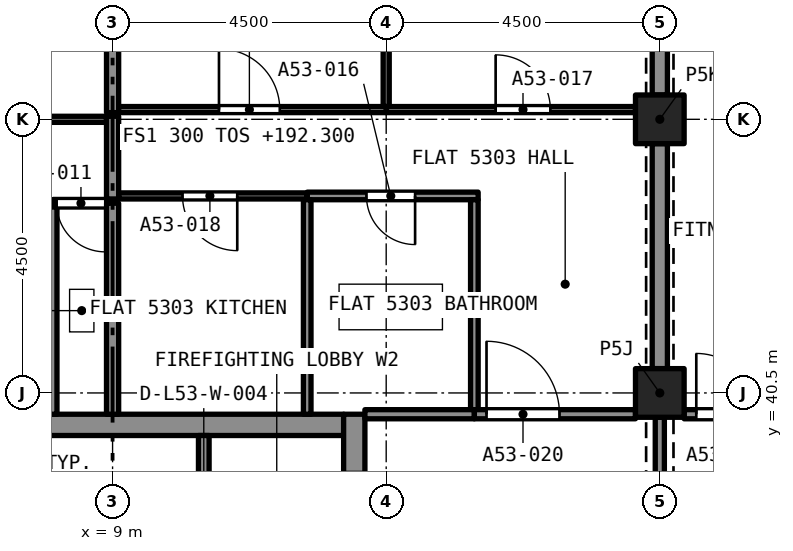
"""IFC4 building model, lengths in metres.
Left out: names, types, materials, properties, quantities, classifications, styles, units other than length and angle.
Written with IfcOpenShell. Run it as: python <this file> out.ifc"""

import sys

from ifc_helpers import new_model, si_unit, direction, frame, frame_2d, origin, origin_2d, place, context, subcontext, project, spatial, rectangle, extrude, element, fill, save


model = new_model("IFC4")
c1 = context("Model", 3, precision=1e-05, world=origin(), true_north=direction((0.0, 1.0)))
c2 = subcontext(c1, "Body", "Model", "MODEL_VIEW")
j1 = project(units=[si_unit("LENGTHUNIT", "METRE"), si_unit("PLANEANGLEUNIT", "RADIAN")], contexts=[c1])
p1 = place(None, origin())
s1 = spatial("IfcSite", under=j1, at=p1, CompositionType="ELEMENT")
p2 = place(p1, origin())
s2 = spatial("IfcBuilding", under=s1, at=p2, CompositionType="ELEMENT")
p3 = place(p2, frame((0.0, 0.0, 192.3)))
s3 = spatial("IfcBuildingStorey", under=s2, at=p3, CompositionType="ELEMENT", Elevation=192.3)
for number, where, z_axis, x_axis in (
    (1, (18.0, 40.5, 0.0), (0.0, 0.0, 1.0), (1.0, 0.0, 0.0)),
    (2, (18.0, 45.0, 0.0), (0.0, 0.0, 1.0), (1.0, 0.0, 0.0)),
):
    element("IfcColumn", number, at=place(p3, frame(where, z_axis=z_axis, x_axis=x_axis)), inside=s3, PredefinedType="COLUMN", context=c2, shape_type="SweptSolid", body=[
        extrude(rectangle(XDim=0.8, YDim=0.8, at=origin_2d()), origin(), (0.0, 0.0, 1.0), 3.2),
    ])
p4 = place(p3, frame((5.2, 39.975, 0.0), z_axis=(0.0, 0.0, 1.0), x_axis=(1.0, 0.0, 0.0)))
e3 = element("IfcWall", 3, at=p4, inside=s3, PredefinedType="SOLIDWALL", context=c2, shape_type="SweptSolid", body=[
    extrude(rectangle(XDim=7.6, YDim=0.35, at=frame_2d((3.8, 0.0))), origin(), (0.0, 0.0, 1.0), 3.2),
])
p5 = place(p3, frame((12.975, 27.35, 0.0), z_axis=(0.0, 0.0, 1.0), x_axis=(0.0, 1.0, 0.0)))
e4 = element("IfcWall", 4, at=p5, inside=s3, PredefinedType="SOLIDWALL", context=c2, shape_type="SweptSolid", body=[
    extrude(rectangle(XDim=12.8, YDim=0.35, at=frame_2d((6.4, 0.0))), origin(), (0.0, 0.0, 1.0), 3.2),
])
p6 = place(p5, frame((10.75, 0.0, 0.0)))
e5 = element("IfcOpeningElement", 5, at=p6, cuts=e4, PredefinedType="OPENING", context=c2, shape_type="SweptSolid", body=[
    extrude(rectangle(XDim=1.1, YDim=2.1, at=frame_2d((0.55, 1.05))), frame((0.0, 0.185, 0.0), z_axis=(0.0, -1.0, 0.0), x_axis=(1.0, 0.0, 0.0)), (0.0, 0.0, 1.0), 0.37),
])
p7 = place(p5, frame((8.6, 0.0, 0.0)))
e6 = element("IfcOpeningElement", 6, at=p7, cuts=e4, PredefinedType="OPENING", context=c2, shape_type="SweptSolid", body=[
    extrude(rectangle(XDim=1.2, YDim=2.1, at=frame_2d((0.6, 1.05))), frame((0.0, 0.185, 0.0), z_axis=(0.0, -1.0, 0.0), x_axis=(1.0, 0.0, 0.0)), (0.0, 0.0, 1.0), 0.37),
])
p8 = place(p3, frame((9.0, 43.62, 0.0), z_axis=(0.0, 0.0, 1.0), x_axis=(-1.0, 0.0, 0.0)))
e7 = element("IfcWall", 7, at=p8, inside=s3, PredefinedType="PARTITIONING", context=c2, shape_type="SweptSolid", body=[
    extrude(rectangle(XDim=0.977, YDim=0.125, at=frame_2d((0.489, 0.0))), origin(), (0.0, 0.0, 1.0), 2.9),
])
p9 = place(p8, frame((0.12, 0.0, 0.0)))
e8 = element("IfcOpeningElement", 8, at=p9, cuts=e7, PredefinedType="OPENING", context=c2, shape_type="SweptSolid", body=[
    extrude(rectangle(XDim=0.8, YDim=2.1, at=frame_2d((0.4, 1.05))), frame((0.0, 0.073, 0.0), z_axis=(0.0, -1.0, 0.0), x_axis=(1.0, 0.0, 0.0)), (0.0, 0.0, 1.0), 0.145),
])
p10 = place(p3, frame((8.023, 40.15, 0.0), z_axis=(0.0, 0.0, 1.0), x_axis=(0.0, 1.0, 0.0)))
e9 = element("IfcWall", 9, at=p10, inside=s3, PredefinedType="PARTITIONING", context=c2, shape_type="SweptSolid", body=[
    extrude(rectangle(XDim=3.408, YDim=0.125, at=frame_2d((1.704, 0.0))), origin(), (0.0, 0.0, 1.0), 2.9),
])
p11 = place(p3, frame((9.0, 40.15, 0.0), z_axis=(0.0, 0.0, 1.0), x_axis=(0.0, 1.0, 0.0)))
e10 = element("IfcWall", 10, at=p11, inside=s3, PredefinedType="PARTITIONING", context=c2, shape_type="SweptSolid", body=[
    extrude(rectangle(XDim=3.47, YDim=0.2, at=frame_2d((1.735, 0.0))), origin(), (0.0, 0.0, 1.0), 2.9),
])
p12 = place(p3, frame((4.5, 45.0, 0.0), z_axis=(0.0, 0.0, 1.0), x_axis=(1.0, 0.0, 0.0)))
e11 = element("IfcWall", 11, at=p12, inside=s3, PredefinedType="PARTITIONING", context=c2, shape_type="SweptSolid", body=[
    extrude(rectangle(XDim=4.4, YDim=0.1, at=frame_2d((2.2, 0.0))), origin(), (0.0, 0.0, 1.0), 2.9),
])
p13 = place(p12, frame((1.8, 0.0, 0.0)))
e12 = element("IfcOpeningElement", 12, at=p13, cuts=e11, PredefinedType="OPENING", context=c2, shape_type="SweptSolid", body=[
    extrude(rectangle(XDim=0.9, YDim=2.1, at=frame_2d((0.45, 1.05))), frame((0.0, 0.06, 0.0), z_axis=(0.0, -1.0, 0.0), x_axis=(1.0, 0.0, 0.0)), (0.0, 0.0, 1.0), 0.12),
])
p14 = place(p3, frame((9.0, 45.11, 0.0), z_axis=(0.0, 0.0, 1.0), x_axis=(0.0, 1.0, 0.0)))
e13 = element("IfcWall", 13, at=p14, inside=s3, PredefinedType="PARTITIONING", context=c2, shape_type="SweptSolid", body=[
    extrude(rectangle(XDim=3.99, YDim=0.2, at=frame_2d((1.995, 0.0))), origin(), (0.0, 0.0, 1.0), 2.9),
])
p15 = place(p3, frame((8.023, 43.62, 0.0), z_axis=(0.0, 0.0, 1.0), x_axis=(-1.0, 0.0, 0.0)))
e14 = element("IfcWall", 14, at=p15, inside=s3, PredefinedType="PARTITIONING", context=c2, shape_type="SweptSolid", body=[
    extrude(rectangle(XDim=1.223, YDim=0.1, at=frame_2d((0.611, 0.0))), origin(), (0.0, 0.0, 1.0), 2.9),
])
p16 = place(p15, frame((0.136, 0.0, 0.0)))
e15 = element("IfcOpeningElement", 15, at=p16, cuts=e14, PredefinedType="OPENING", context=c2, shape_type="SweptSolid", body=[
    extrude(rectangle(XDim=0.9, YDim=2.1, at=frame_2d((0.45, 1.05))), frame((0.0, 0.06, 0.0), z_axis=(0.0, -1.0, 0.0), x_axis=(1.0, 0.0, 0.0)), (0.0, 0.0, 1.0), 0.12),
])
p17 = place(p3, frame((9.0, 43.69, 0.0), z_axis=(0.0, 0.0, 1.0), x_axis=(0.0, 1.0, 0.0)))
e16 = element("IfcWall", 16, at=p17, inside=s3, PredefinedType="PARTITIONING", context=c2, shape_type="SweptSolid", body=[
    extrude(rectangle(XDim=1.36, YDim=0.2, at=frame_2d((0.68, 0.0))), origin(), (0.0, 0.0, 1.0), 2.9),
])
p18 = place(p3, frame((15.012, 43.74, 0.0), z_axis=(0.0, 0.0, 1.0), x_axis=(-1.0, 0.0, 0.0)))
e17 = element("IfcWall", 17, at=p18, inside=s3, PredefinedType="PARTITIONING", context=c2, shape_type="SweptSolid", body=[
    extrude(rectangle(XDim=2.812, YDim=0.125, at=frame_2d((1.406, 0.0))), origin(), (0.0, 0.0, 1.0), 2.9),
])
p19 = place(p18, frame((1.037, 0.0, 0.0)))
e18 = element("IfcOpeningElement", 18, at=p19, cuts=e17, PredefinedType="OPENING", context=c2, shape_type="SweptSolid", body=[
    extrude(rectangle(XDim=0.8, YDim=2.1, at=frame_2d((0.4, 1.05))), frame((0.0, 0.073, 0.0), z_axis=(0.0, -1.0, 0.0), x_axis=(1.0, 0.0, 0.0)), (0.0, 0.0, 1.0), 0.145),
])
p20 = place(p3, frame((14.95, 40.225, 0.0), z_axis=(0.0, 0.0, 1.0), x_axis=(0.0, 1.0, 0.0)))
e19 = element("IfcWall", 19, at=p20, inside=s3, PredefinedType="PARTITIONING", context=c2, shape_type="SweptSolid", body=[
    extrude(rectangle(XDim=3.452, YDim=0.125, at=frame_2d((1.726, 0.0))), origin(), (0.0, 0.0, 1.0), 2.9),
])
p21 = place(p3, frame((12.201, 40.15, 0.0), z_axis=(0.0, 0.0, 1.0), x_axis=(0.0, 1.0, 0.0)))
e20 = element("IfcWall", 20, at=p21, inside=s3, PredefinedType="PARTITIONING", context=c2, shape_type="SweptSolid", body=[
    extrude(rectangle(XDim=3.528, YDim=0.125, at=frame_2d((1.764, 0.0))), origin(), (0.0, 0.0, 1.0), 2.9),
])
p22 = place(p3, frame((13.15, 40.15, 0.0), z_axis=(0.0, 0.0, 1.0), x_axis=(1.0, 0.0, 0.0)))
e21 = element("IfcWall", 21, at=p22, inside=s3, PredefinedType="PARTITIONING", context=c2, shape_type="SweptSolid", body=[
    extrude(rectangle(XDim=1.8, YDim=0.15, at=frame_2d((0.9, 0.0))), origin(), (0.0, 0.0, 1.0), 2.9),
])
p23 = place(p3, frame((13.5, 45.16, 0.0), z_axis=(0.0, 0.0, 1.0), x_axis=(1.0, 0.0, 0.0)))
e22 = element("IfcWall", 22, at=p23, inside=s3, PredefinedType="PARTITIONING", context=c2, shape_type="SweptSolid", body=[
    extrude(rectangle(XDim=4.1, YDim=0.1, at=frame_2d((2.05, 0.0))), origin(), (0.0, 0.0, 1.0), 2.9),
])
p24 = place(p23, frame((1.8, 0.0, 0.0)))
e23 = element("IfcOpeningElement", 23, at=p24, cuts=e22, PredefinedType="OPENING", context=c2, shape_type="SweptSolid", body=[
    extrude(rectangle(XDim=0.9, YDim=2.1, at=frame_2d((0.45, 1.05))), frame((0.0, 0.06, 0.0), z_axis=(0.0, -1.0, 0.0), x_axis=(1.0, 0.0, 0.0)), (0.0, 0.0, 1.0), 0.12),
])
p25 = place(p3, frame((13.5, 45.21, 0.0), z_axis=(0.0, 0.0, 1.0), x_axis=(0.0, 1.0, 0.0)))
e24 = element("IfcWall", 24, at=p25, inside=s3, PredefinedType="PARTITIONING", context=c2, shape_type="SweptSolid", body=[
    extrude(rectangle(XDim=3.89, YDim=0.1, at=frame_2d((1.945, 0.0))), origin(), (0.0, 0.0, 1.0), 2.9),
])
p26 = place(p3, frame((18.0, 45.4, 0.0), z_axis=(0.0, 0.0, 1.0), x_axis=(0.0, 1.0, 0.0)))
e25 = element("IfcWall", 25, at=p26, inside=s3, PredefinedType="PARTITIONING", context=c2, shape_type="SweptSolid", body=[
    extrude(rectangle(XDim=3.7, YDim=0.25, at=frame_2d((1.85, 0.0))), origin(), (0.0, 0.0, 1.0), 2.38),
])
p27 = place(p3, frame((12.201, 43.74, 0.0), z_axis=(0.0, 0.0, 1.0), x_axis=(-1.0, 0.0, 0.0)))
e26 = element("IfcWall", 26, at=p27, inside=s3, PredefinedType="PARTITIONING", context=c2, shape_type="SweptSolid", body=[
    extrude(rectangle(XDim=3.101, YDim=0.1, at=frame_2d((1.55, 0.0))), origin(), (0.0, 0.0, 1.0), 2.9),
])
p28 = place(p27, frame((1.15, 0.0, 0.0)))
e27 = element("IfcOpeningElement", 27, at=p28, cuts=e26, PredefinedType="OPENING", context=c2, shape_type="SweptSolid", body=[
    extrude(rectangle(XDim=0.9, YDim=2.1, at=frame_2d((0.45, 1.05))), frame((0.0, 0.06, 0.0), z_axis=(0.0, -1.0, 0.0), x_axis=(1.0, 0.0, 0.0)), (0.0, 0.0, 1.0), 0.12),
])
p29 = place(p3, frame((9.1, 45.16, 0.0), z_axis=(0.0, 0.0, 1.0), x_axis=(1.0, 0.0, 0.0)))
e28 = element("IfcWall", 28, at=p29, inside=s3, PredefinedType="PARTITIONING", context=c2, shape_type="SweptSolid", body=[
    extrude(rectangle(XDim=4.4, YDim=0.1, at=frame_2d((2.2, 0.0))), origin(), (0.0, 0.0, 1.0), 2.9),
])
p30 = place(p29, frame((1.65, 0.0, 0.0)))
e29 = element("IfcOpeningElement", 29, at=p30, cuts=e28, PredefinedType="OPENING", context=c2, shape_type="SweptSolid", body=[
    extrude(rectangle(XDim=1.0, YDim=2.1, at=frame_2d((0.5, 1.05))), frame((0.0, 0.06, 0.0), z_axis=(0.0, -1.0, 0.0), x_axis=(1.0, 0.0, 0.0)), (0.0, 0.0, 1.0), 0.12),
])
p31 = place(p3, frame((18.0, 40.9, 0.0), z_axis=(0.0, 0.0, 1.0), x_axis=(0.0, 1.0, 0.0)))
e30 = element("IfcWall", 30, at=p31, inside=s3, PredefinedType="PARTITIONING", context=c2, shape_type="SweptSolid", body=[
    extrude(rectangle(XDim=3.7, YDim=0.25, at=frame_2d((1.85, 0.0))), origin(), (0.0, 0.0, 1.0), 2.38),
])
p32 = place(p3, frame((14.95, 40.15, 0.0), z_axis=(0.0, 0.0, 1.0), x_axis=(1.0, 0.0, 0.0)))
e31 = element("IfcWall", 31, at=p32, inside=s3, PredefinedType="PARTITIONING", context=c2, shape_type="SweptSolid", body=[
    extrude(rectangle(XDim=2.65, YDim=0.15, at=frame_2d((1.325, 0.0))), origin(), (0.0, 0.0, 1.0), 2.9),
])
p33 = place(p32, frame((0.2, 0.0, 0.0)))
e32 = element("IfcOpeningElement", 32, at=p33, cuts=e31, PredefinedType="OPENING", context=c2, shape_type="SweptSolid", body=[
    extrude(rectangle(XDim=1.2, YDim=2.4, at=frame_2d((0.6, 1.2))), frame((0.0, 0.085, 0.0), z_axis=(0.0, -1.0, 0.0), x_axis=(1.0, 0.0, 0.0)), (0.0, 0.0, 1.0), 0.17),
])
p34 = place(p3, frame((18.4, 40.15, 0.0), z_axis=(0.0, 0.0, 1.0), x_axis=(1.0, 0.0, 0.0)))
e33 = element("IfcWall", 33, at=p34, inside=s3, PredefinedType="PARTITIONING", context=c2, shape_type="SweptSolid", body=[
    extrude(rectangle(XDim=2.2, YDim=0.15, at=frame_2d((1.1, 0.0))), origin(), (0.0, 0.0, 1.0), 2.75),
])
p35 = place(p34, frame((0.2, 0.0, 0.0)))
e34 = element("IfcOpeningElement", 34, at=p35, cuts=e33, PredefinedType="OPENING", context=c2, shape_type="SweptSolid", body=[
    extrude(rectangle(XDim=1.0, YDim=2.1, at=frame_2d((0.5, 1.05))), frame((0.0, 0.085, 0.0), z_axis=(0.0, -1.0, 0.0), x_axis=(1.0, 0.0, 0.0)), (0.0, 0.0, 1.0), 0.17),
])
p36 = place(p3, frame((18.0, 40.1, 0.0), z_axis=(0.0, 0.0, 1.0), x_axis=(0.0, -1.0, 0.0)))
e35 = element("IfcWall", 35, at=p36, inside=s3, PredefinedType="PARTITIONING", context=c2, shape_type="SweptSolid", body=[
    extrude(rectangle(XDim=3.7, YDim=0.15, at=frame_2d((1.85, 0.0))), origin(), (0.0, 0.0, 1.0), 2.38),
])
p37 = place(p36, frame((1.25, 0.0, 0.0)))
e36 = element("IfcOpeningElement", 36, at=p37, cuts=e35, PredefinedType="OPENING", context=c2, shape_type="SweptSolid", body=[
    extrude(rectangle(XDim=1.2, YDim=2.1, at=frame_2d((0.6, 1.05))), frame((0.0, 0.085, 0.0), z_axis=(0.0, -1.0, 0.0), x_axis=(1.0, 0.0, 0.0)), (0.0, 0.0, 1.0), 0.17),
])
p38 = place(p3, frame((10.5, 37.5, 0.0), z_axis=(0.0, 0.0, 1.0), x_axis=(0.0, 1.0, 0.0)))
e37 = element("IfcWall", 37, at=p38, inside=s3, PredefinedType="SOLIDWALL", context=c2, shape_type="SweptSolid", body=[
    extrude(rectangle(XDim=2.3, YDim=0.175, at=frame_2d((1.15, 0.0))), origin(), (0.0, 0.0, 1.0), 2.9),
])
p39 = place(p38, frame((0.65, 0.0, 0.0)))
e38 = element("IfcOpeningElement", 38, at=p39, cuts=e37, PredefinedType="OPENING", context=c2, shape_type="SweptSolid", body=[
    extrude(rectangle(XDim=1.0, YDim=2.1, at=frame_2d((0.5, 1.05))), frame((0.0, 0.097, 0.0), z_axis=(0.0, -1.0, 0.0), x_axis=(1.0, 0.0, 0.0)), (0.0, 0.0, 1.0), 0.195),
])
p40 = place(p9, origin())
e39 = element("IfcDoor", 39, at=p40, inside=s3, OperationType="SINGLE_SWING_LEFT", PredefinedType="DOOR", context=c2, shape_type="SweptSolid", body=[
    extrude(rectangle(XDim=0.8, YDim=2.1, at=frame_2d((0.4, 1.05))), frame((0.0, 0.025, 0.0), z_axis=(0.0, -1.0, 0.0), x_axis=(1.0, 0.0, 0.0)), (0.0, 0.0, 1.0), 0.05),
])
fill(e8, e39)
p41 = place(p19, origin())
e40 = element("IfcDoor", 40, at=p41, inside=s3, OperationType="SINGLE_SWING_RIGHT", PredefinedType="DOOR", context=c2, shape_type="SweptSolid", body=[
    extrude(rectangle(XDim=0.8, YDim=2.1, at=frame_2d((0.4, 1.05))), frame((0.0, 0.025, 0.0), z_axis=(0.0, -1.0, 0.0), x_axis=(1.0, 0.0, 0.0)), (0.0, 0.0, 1.0), 0.05),
])
fill(e18, e40)
p42 = place(p24, origin())
e41 = element("IfcDoor", 41, at=p42, inside=s3, OperationType="SINGLE_SWING_RIGHT", PredefinedType="DOOR", context=c2, shape_type="SweptSolid", body=[
    extrude(rectangle(XDim=0.9, YDim=2.1, at=frame_2d((0.45, 1.05))), frame((0.0, 0.025, 0.0), z_axis=(0.0, -1.0, 0.0), x_axis=(1.0, 0.0, 0.0)), (0.0, 0.0, 1.0), 0.05),
])
fill(e23, e41)
p43 = place(p28, origin())
e42 = element("IfcDoor", 42, at=p43, inside=s3, OperationType="SINGLE_SWING_RIGHT", PredefinedType="DOOR", context=c2, shape_type="SweptSolid", body=[
    extrude(rectangle(XDim=0.9, YDim=2.1, at=frame_2d((0.45, 1.05))), frame((0.0, 0.025, 0.0), z_axis=(0.0, -1.0, 0.0), x_axis=(1.0, 0.0, 0.0)), (0.0, 0.0, 1.0), 0.05),
])
fill(e27, e42)
p44 = place(p30, origin())
e43 = element("IfcDoor", 43, at=p44, inside=s3, OperationType="SINGLE_SWING_LEFT", PredefinedType="DOOR", context=c2, shape_type="SweptSolid", body=[
    extrude(rectangle(XDim=1.0, YDim=2.1, at=frame_2d((0.5, 1.05))), frame((0.0, 0.025, 0.0), z_axis=(0.0, -1.0, 0.0), x_axis=(1.0, 0.0, 0.0)), (0.0, 0.0, 1.0), 0.05),
])
fill(e29, e43)
p45 = place(p33, origin())
e44 = element("IfcDoor", 44, at=p45, inside=s3, OperationType="SINGLE_SWING_LEFT", PredefinedType="DOOR", context=c2, shape_type="SweptSolid", body=[
    extrude(rectangle(XDim=1.2, YDim=2.4, at=frame_2d((0.6, 1.2))), frame((0.0, 0.025, 0.0), z_axis=(0.0, -1.0, 0.0), x_axis=(1.0, 0.0, 0.0)), (0.0, 0.0, 1.0), 0.05),
])
fill(e32, e44)
p46 = place(p35, origin())
e45 = element("IfcDoor", 45, at=p46, inside=s3, OperationType="SINGLE_SWING_LEFT", PredefinedType="DOOR", context=c2, shape_type="SweptSolid", body=[
    extrude(rectangle(XDim=1.0, YDim=2.1, at=frame_2d((0.5, 1.05))), frame((0.0, 0.025, 0.0), z_axis=(0.0, -1.0, 0.0), x_axis=(1.0, 0.0, 0.0)), (0.0, 0.0, 1.0), 0.05),
])
fill(e34, e45)
save(model, sys.argv[1])
